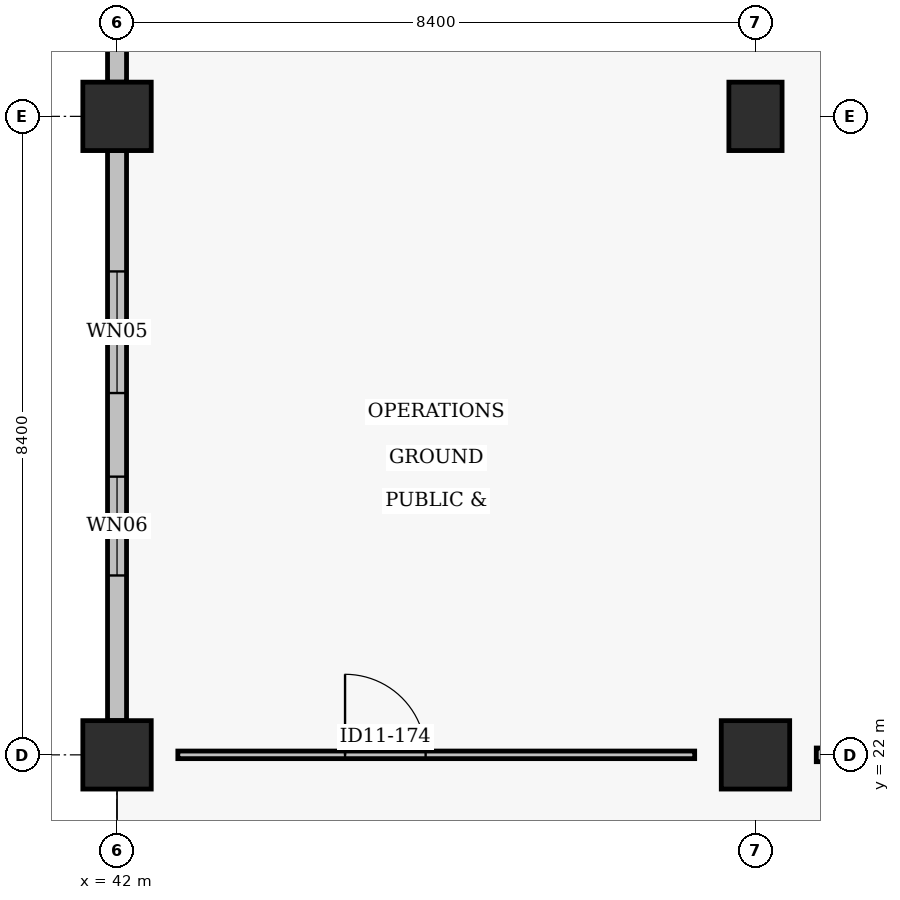
"""IFC4 building model, lengths in metres.
Left out: names, types, materials, properties, quantities, classifications, styles, units other than length and angle.
Written with IfcOpenShell. Run it as: python <this file> out.ifc"""

import sys

from ifc_helpers import new_model, si_unit, direction, frame, frame_2d, origin, origin_2d, place, context, subcontext, project, spatial, rectangle, extrude, element, fill, save


model = new_model("IFC4")
c1 = context("Model", 3, precision=1e-05, world=origin(), true_north=direction((0.0, 1.0)))
c2 = subcontext(c1, "Body", "Model", "MODEL_VIEW")
j1 = project(units=[si_unit("LENGTHUNIT", "METRE"), si_unit("PLANEANGLEUNIT", "RADIAN")], contexts=[c1])
p1 = place(None, origin())
s1 = spatial("IfcSite", under=j1, at=p1, CompositionType="ELEMENT")
p2 = place(p1, origin())
s2 = spatial("IfcBuilding", under=s1, at=p2, CompositionType="ELEMENT")
p3 = place(p2, origin())
s3 = spatial("IfcBuildingStorey", under=s2, at=p3, CompositionType="ELEMENT", Elevation=0.0)
for number, where, z_axis, x_axis in (
    (1, (42.0, 22.0, -0.46), (0.0, 0.0, 1.0), (1.0, 0.0, 0.0)),
    (2, (50.4, 22.0, -0.46), (0.0, 0.0, 1.0), (1.0, 0.0, 0.0)),
    (3, (42.0, 30.4, -0.46), (0.0, 0.0, 1.0), (1.0, 0.0, 0.0)),
):
    element("IfcColumn", number, at=place(p3, frame(where, z_axis=z_axis, x_axis=x_axis)), inside=s3, PredefinedType="COLUMN", context=c2, shape_type="SweptSolid", body=[
        extrude(rectangle(XDim=0.9, YDim=0.9, at=origin_2d()), origin(), (0.0, 0.0, 1.0), 5.9),
    ])
p4 = place(p3, frame((50.4, 30.4, -0.46), z_axis=(0.0, 0.0, 1.0), x_axis=(1.0, 0.0, 0.0)))
e4 = element("IfcColumn", 4, at=p4, inside=s3, PredefinedType="COLUMN", context=c2, shape_type="SweptSolid", body=[
    extrude(rectangle(XDim=0.7, YDim=0.9, at=origin_2d()), origin(), (0.0, 0.0, 1.0), 5.9),
])
p5 = place(p3, frame((42.0, 29.95, 0.0), z_axis=(0.0, 0.0, 1.0), x_axis=(0.0, -1.0, 0.0)))
e5 = element("IfcWall", 5, at=p5, inside=s3, PredefinedType="SOLIDWALL", context=c2, shape_type="SweptSolid", body=[
    extrude(rectangle(XDim=7.5, YDim=0.25, at=frame_2d((3.75, 0.0))), origin(), (0.0, 0.0, 1.0), 4.625),
])
p6 = place(p5, frame((1.59, 0.0, 0.95)))
e6 = element("IfcOpeningElement", 6, at=p6, cuts=e5, PredefinedType="OPENING", context=c2, shape_type="SweptSolid", body=[
    extrude(rectangle(XDim=1.6, YDim=1.35, at=frame_2d((0.8, 0.675))), frame((0.0, 0.135, 0.0), z_axis=(0.0, -1.0, 0.0), x_axis=(1.0, 0.0, 0.0)), (0.0, 0.0, 1.0), 0.27),
])
p7 = place(p5, frame((4.29, 0.0, 0.95)))
e7 = element("IfcOpeningElement", 7, at=p7, cuts=e5, PredefinedType="OPENING", context=c2, shape_type="SweptSolid", body=[
    extrude(rectangle(XDim=1.3, YDim=1.35, at=frame_2d((0.65, 0.675))), frame((0.0, 0.135, 0.0), z_axis=(0.0, -1.0, 0.0), x_axis=(1.0, 0.0, 0.0)), (0.0, 0.0, 1.0), 0.27),
])
p8 = place(p3, frame((42.0, 38.35, 0.0), z_axis=(0.0, 0.0, 1.0), x_axis=(0.0, -1.0, 0.0)))
e8 = element("IfcWall", 8, at=p8, inside=s3, PredefinedType="SOLIDWALL", context=c2, shape_type="SweptSolid", body=[
    extrude(rectangle(XDim=7.5, YDim=0.25, at=frame_2d((3.75, 0.0))), origin(), (0.0, 0.0, 1.0), 4.625),
])
p9 = place(p8, frame((1.59, 0.0, 0.95)))
e9 = element("IfcOpeningElement", 9, at=p9, cuts=e8, PredefinedType="OPENING", context=c2, shape_type="SweptSolid", body=[
    extrude(rectangle(XDim=1.6, YDim=1.35, at=frame_2d((0.8, 0.675))), frame((0.0, 0.135, 0.0), z_axis=(0.0, -1.0, 0.0), x_axis=(1.0, 0.0, 0.0)), (0.0, 0.0, 1.0), 0.27),
])
p10 = place(p8, frame((4.29, 0.0, 0.95)))
e10 = element("IfcOpeningElement", 10, at=p10, cuts=e8, PredefinedType="OPENING", context=c2, shape_type="SweptSolid", body=[
    extrude(rectangle(XDim=1.3, YDim=1.35, at=frame_2d((0.65, 0.675))), frame((0.0, 0.135, 0.0), z_axis=(0.0, -1.0, 0.0), x_axis=(1.0, 0.0, 0.0)), (0.0, 0.0, 1.0), 0.27),
])
p11 = place(p3, frame((42.8, 22.0, 0.0), z_axis=(0.0, 0.0, 1.0), x_axis=(1.0, 0.0, 0.0)))
e11 = element("IfcWall", 11, at=p11, inside=s3, PredefinedType="PARTITIONING", context=c2, shape_type="SweptSolid", body=[
    extrude(rectangle(XDim=6.8, YDim=0.1, at=frame_2d((3.4, 0.0))), origin(), (0.0, 0.0, 1.0), 2.55),
])
p12 = place(p11, frame((2.2, 0.0, 0.0)))
e12 = element("IfcOpeningElement", 12, at=p12, cuts=e11, PredefinedType="OPENING", context=c2, shape_type="SweptSolid", body=[
    extrude(rectangle(XDim=1.06, YDim=2.1, at=frame_2d((0.53, 1.05))), frame((0.0, 0.06, 0.0), z_axis=(0.0, -1.0, 0.0), x_axis=(1.0, 0.0, 0.0)), (0.0, 0.0, 1.0), 0.12),
])
p13 = place(p3, frame((51.2, 22.0, 0.0), z_axis=(0.0, 0.0, 1.0), x_axis=(1.0, 0.0, 0.0)))
e13 = element("IfcWall", 13, at=p13, inside=s3, PredefinedType="SOLIDWALL", context=c2, shape_type="SweptSolid", body=[
    extrude(rectangle(XDim=6.8, YDim=0.18, at=frame_2d((3.4, 0.0))), origin(), (0.0, 0.0, 1.0), 2.55),
])
p14 = place(p13, frame((2.2, 0.0, 0.0)))
e14 = element("IfcOpeningElement", 14, at=p14, cuts=e13, PredefinedType="OPENING", context=c2, shape_type="SweptSolid", body=[
    extrude(rectangle(XDim=1.16, YDim=2.14, at=frame_2d((0.58, 1.07))), frame((0.0, 0.1, 0.0), z_axis=(0.0, -1.0, 0.0), x_axis=(1.0, 0.0, 0.0)), (0.0, 0.0, 1.0), 0.2),
])
p15 = place(p6, origin())
e15 = element("IfcWindow", 15, at=p15, inside=s3, PartitioningType="DOUBLE_PANEL_VERTICAL", PredefinedType="WINDOW", context=c2, shape_type="SweptSolid", body=[
    extrude(rectangle(XDim=1.6, YDim=1.35, at=frame_2d((0.8, 0.675))), frame((0.0, 0.03, 0.0), z_axis=(0.0, -1.0, 0.0), x_axis=(1.0, 0.0, 0.0)), (0.0, 0.0, 1.0), 0.06),
])
fill(e6, e15)
p16 = place(p7, origin())
e16 = element("IfcWindow", 16, at=p16, inside=s3, PartitioningType="SINGLE_PANEL", PredefinedType="WINDOW", context=c2, shape_type="SweptSolid", body=[
    extrude(rectangle(XDim=1.3, YDim=1.35, at=frame_2d((0.65, 0.675))), frame((0.0, 0.03, 0.0), z_axis=(0.0, -1.0, 0.0), x_axis=(1.0, 0.0, 0.0)), (0.0, 0.0, 1.0), 0.06),
])
fill(e7, e16)
p17 = place(p12, origin())
e17 = element("IfcDoor", 17, at=p17, inside=s3, OperationType="SINGLE_SWING_LEFT", PredefinedType="DOOR", context=c2, shape_type="SweptSolid", body=[
    extrude(rectangle(XDim=1.06, YDim=2.1, at=frame_2d((0.53, 1.05))), frame((0.0, 0.025, 0.0), z_axis=(0.0, -1.0, 0.0), x_axis=(1.0, 0.0, 0.0)), (0.0, 0.0, 1.0), 0.05),
])
fill(e12, e17)
save(model, sys.argv[1])
